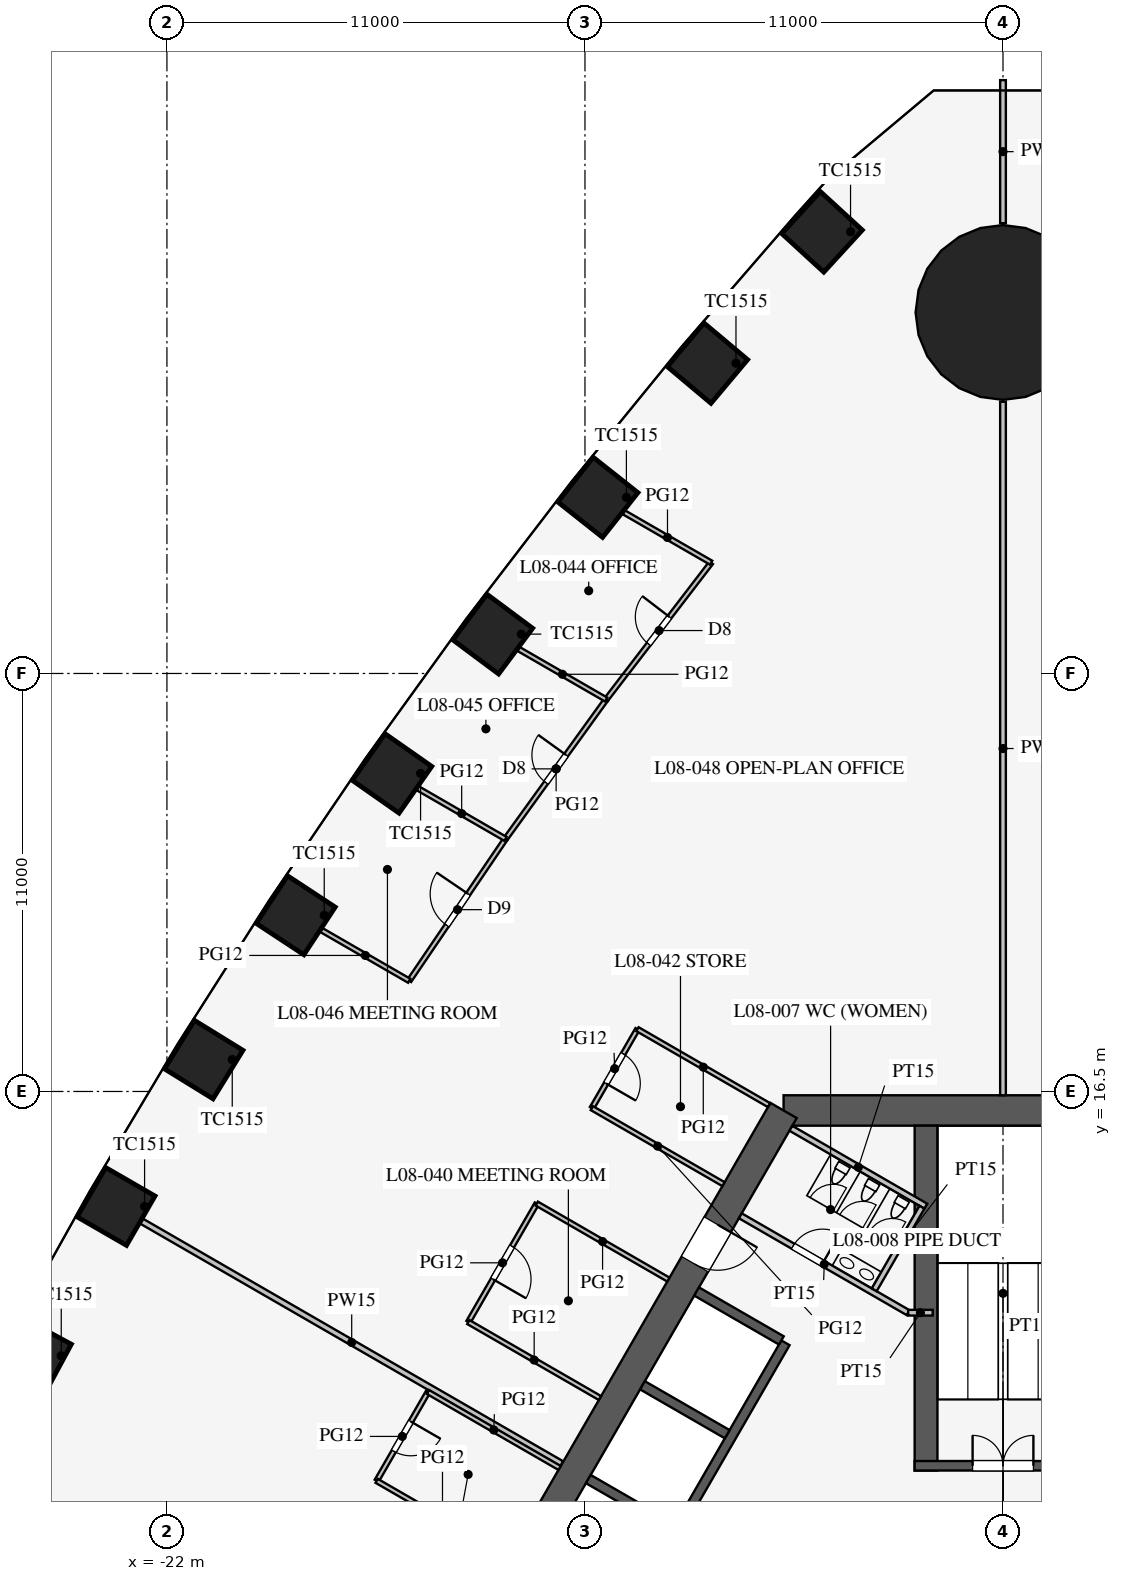
"""IFC4 building model, lengths in metres.
Left out: names, types, materials, properties, quantities, classifications, styles, units other than length and angle.
Written with IfcOpenShell. Run it as: python <this file> out.ifc"""

import sys

from ifc_helpers import new_model, si_unit, direction, frame, frame_2d, origin, origin_2d, place, context, subcontext, project, spatial, rectangle, circle, extrude, element, fill, save


model = new_model("IFC4")
c1 = context("Model", 3, precision=1e-05, world=origin(), true_north=direction((0.0, 1.0)))
c2 = subcontext(c1, "Body", "Model", "MODEL_VIEW")
j1 = project(units=[si_unit("LENGTHUNIT", "METRE"), si_unit("PLANEANGLEUNIT", "RADIAN")], contexts=[c1])
p1 = place(None, origin())
s1 = spatial("IfcSite", under=j1, at=p1, CompositionType="ELEMENT")
p2 = place(p1, origin())
s2 = spatial("IfcBuilding", under=s1, at=p2, CompositionType="ELEMENT")
p3 = place(p2, frame((0.0, 0.0, 37.5)))
s3 = spatial("IfcBuildingStorey", under=s2, at=p3, CompositionType="ELEMENT", Elevation=37.5)
for number, where, z_axis, x_axis in (
    (1, (-4.762, 39.122, 0.0), (0.0, 0.0, 1.0), (-0.676, -0.737, 0.0)),
    (2, (-7.776, 35.667, 0.0), (0.0, 0.0, 1.0), (-0.643, -0.766, 0.0)),
    (3, (-10.66, 32.135, 0.0), (0.0, 0.0, 1.0), (-0.62, -0.784, 0.0)),
    (4, (-13.426, 28.536, 0.0), (0.0, 0.0, 1.0), (-0.597, -0.802, 0.0)),
    (5, (-16.076, 24.87, 0.0), (0.0, 0.0, 1.0), (-0.574, -0.819, 0.0)),
    (6, (-18.611, 21.137, 0.0), (0.0, 0.0, 1.0), (-0.549, -0.836, 0.0)),
    (7, (-21.031, 17.339, 0.0), (0.0, 0.0, 1.0), (-0.525, -0.851, 0.0)),
    (8, (-23.338, 13.474, 0.0), (0.0, 0.0, 1.0), (-0.5, -0.866, 0.0)),
    (9, (-25.531, 9.544, 0.0), (0.0, 0.0, 1.0), (-0.475, -0.88, 0.0)),
):
    element("IfcColumn", number, at=place(p3, frame(where, z_axis=z_axis, x_axis=x_axis)), inside=s3, PredefinedType="COLUMN", context=c2, shape_type="SweptSolid", body=[
        extrude(rectangle(XDim=1.5, YDim=1.5, at=origin_2d()), origin(), (0.0, 0.0, 1.0), 4.2),
    ])
p4 = place(p3, frame((0.0, 37.0, 0.0), z_axis=(0.0, 0.0, 1.0), x_axis=(1.0, 0.0, 0.0)))
e10 = element("IfcColumn", 10, at=p4, inside=s3, PredefinedType="COLUMN", context=c2, shape_type="SweptSolid", body=[
    extrude(circle(Radius=2.3, at=origin_2d()), origin(), (0.0, 0.0, 1.0), 4.2),
])
p5 = place(p3, frame((5.773, 16.0, 0.0), z_axis=(0.0, 0.0, 1.0), x_axis=(-1.0, 0.0, 0.0)))
e11 = element("IfcWall", 11, at=p5, inside=s3, PredefinedType="SHEAR", context=c2, shape_type="SweptSolid", body=[
    extrude(rectangle(XDim=11.547, YDim=0.8, at=frame_2d((5.773, 0.0))), origin(), (0.0, 0.0, 1.0), 4.2),
])
p6 = place(p3, frame((-5.773, 16.0, 0.0), z_axis=(0.0, 0.0, 1.0), x_axis=(-0.500002442456, -0.866023993627, 0.0)))
e12 = element("IfcWall", 12, at=p6, inside=s3, PredefinedType="SHEAR", context=c2, shape_type="SweptSolid", body=[
    extrude(rectangle(XDim=21.939, YDim=0.8, at=frame_2d((10.97, 0.0))), origin(), (0.0, 0.0, 1.0), 4.2),
])
p7 = place(p6, frame((17.27, 0.0, 0.0)))
e13 = element("IfcOpeningElement", 13, at=p7, cuts=e12, PredefinedType="OPENING", context=c2, shape_type="SweptSolid", body=[
    extrude(rectangle(XDim=1.2, YDim=2.1, at=frame_2d((0.6, 1.05))), frame((0.0, 0.41, 0.0), z_axis=(0.0, -1.0, 0.0), x_axis=(1.0, 0.0, 0.0)), (0.0, 0.0, 1.0), 0.82),
])
p8 = place(p6, frame((3.47, 0.0, 0.0)))
e14 = element("IfcOpeningElement", 14, at=p8, cuts=e12, PredefinedType="OPENING", context=c2, shape_type="SweptSolid", body=[
    extrude(rectangle(XDim=1.2, YDim=2.1, at=frame_2d((0.6, 1.05))), frame((0.0, 0.41, 0.0), z_axis=(0.0, -1.0, 0.0), x_axis=(1.0, 0.0, 0.0)), (0.0, 0.0, 1.0), 0.82),
])
p9 = place(p3, frame((-5.724, 9.886, 0.0), z_axis=(0.0, 0.0, 1.0), x_axis=(-0.500001763848, -0.866024385424, 0.0)))
e15 = element("IfcWall", 15, at=p9, inside=s3, PredefinedType="SHEAR", context=c2, shape_type="SweptSolid", body=[
    extrude(rectangle(XDim=11.4, YDim=0.25, at=frame_2d((5.7, 0.0))), origin(), (0.0, 0.0, 1.0), 4.2),
])
p10 = place(p9, frame((6.525, 0.0, 0.0)))
e16 = element("IfcOpeningElement", 16, at=p10, cuts=e15, PredefinedType="OPENING", context=c2, shape_type="SweptSolid", body=[
    extrude(rectangle(XDim=1.2, YDim=2.2, at=frame_2d((0.6, 1.1))), frame((0.0, 0.135, 0.0), z_axis=(0.0, -1.0, 0.0), x_axis=(1.0, 0.0, 0.0)), (0.0, 0.0, 1.0), 0.27),
])
p11 = place(p9, frame((9.375, 0.0, 0.0)))
e17 = element("IfcOpeningElement", 17, at=p11, cuts=e15, PredefinedType="OPENING", context=c2, shape_type="SweptSolid", body=[
    extrude(rectangle(XDim=1.2, YDim=2.2, at=frame_2d((0.6, 1.1))), frame((0.0, 0.135, 0.0), z_axis=(0.0, -1.0, 0.0), x_axis=(1.0, 0.0, 0.0)), (0.0, 0.0, 1.0), 0.27),
])
p12 = place(p3, frame((-5.832, 9.949, 0.0), z_axis=(0.0, 0.0, 1.0), x_axis=(-0.866029291668, 0.499993265928, 0.0)))
e18 = element("IfcWall", 18, at=p12, inside=s3, PredefinedType="SHEAR", context=c2, shape_type="SweptSolid", body=[
    extrude(rectangle(XDim=2.575, YDim=0.25, at=frame_2d((1.288, 0.0))), origin(), (0.0, 0.0, 1.0), 4.2),
])
for number, where, z_axis, x_axis in (
    (19, (-7.257, 7.481, 0.0), (0.0, 0.0, 1.0), (-0.866, 0.5, 0.0)),
    (20, (-8.682, 5.012, 0.0), (0.0, 0.0, 1.0), (-0.866, 0.5, 0.0)),
):
    element("IfcWall", number, at=place(p3, frame(where, z_axis=z_axis, x_axis=x_axis)), inside=s3, PredefinedType="SHEAR", context=c2, shape_type="SweptSolid", body=[
        extrude(rectangle(XDim=2.575, YDim=0.25, at=frame_2d((1.288, 0.0))), origin(), (0.0, 0.0, 1.0), 4.2),
    ])
p13 = place(p3, frame((-2.025, 6.525, 0.0), z_axis=(0.0, 0.0, 1.0), x_axis=(0.0, 1.0, 0.0)))
e21 = element("IfcWall", 21, at=p13, inside=s3, PredefinedType="SHEAR", context=c2, shape_type="SweptSolid", body=[
    extrude(rectangle(XDim=9.075, YDim=0.6, at=frame_2d((4.538, 0.0))), origin(), (0.0, 0.0, 1.0), 4.2),
])
p14 = place(p3, frame((2.325, 6.65, 0.0), z_axis=(0.0, 0.0, 1.0), x_axis=(-1.0, 0.0, 0.0)))
e22 = element("IfcWall", 22, at=p14, inside=s3, PredefinedType="SHEAR", context=c2, shape_type="SweptSolid", body=[
    extrude(rectangle(XDim=4.65, YDim=0.25, at=frame_2d((2.325, 0.0))), origin(), (0.0, 0.0, 1.0), 4.2),
])
p15 = place(p14, frame((1.525, 0.0, 0.0)))
e23 = element("IfcOpeningElement", 23, at=p15, cuts=e22, PredefinedType="OPENING", context=c2, shape_type="SweptSolid", body=[
    extrude(rectangle(XDim=1.6, YDim=2.1, at=frame_2d((0.8, 1.05))), frame((0.0, 0.135, 0.0), z_axis=(0.0, -1.0, 0.0), x_axis=(1.0, 0.0, 0.0)), (0.0, 0.0, 1.0), 0.27),
])
p16 = place(p3, frame((-2.495, 10.678, 0.0), z_axis=(0.0, 0.0, 1.0), x_axis=(-0.86602216432, 0.500005610874, 0.0)))
e24 = element("IfcWall", 24, at=p16, inside=s3, PredefinedType="PARTITIONING", context=c2, shape_type="SweptSolid", body=[
    extrude(rectangle(XDim=5.1, YDim=0.15, at=frame_2d((2.55, 0.0))), origin(), (0.0, 0.0, 1.0), 4.0),
])
p17 = place(p16, frame((2.6, 0.0, 0.0)))
e25 = element("IfcOpeningElement", 25, at=p17, cuts=e24, PredefinedType="OPENING", context=c2, shape_type="SweptSolid", body=[
    extrude(rectangle(XDim=0.9, YDim=2.1, at=frame_2d((0.45, 1.05))), frame((0.0, 0.085, 0.0), z_axis=(0.0, -1.0, 0.0), x_axis=(1.0, 0.0, 0.0)), (0.0, 0.0, 1.0), 0.17),
])
p18 = place(p3, frame((-2.495, 10.678, 0.0), z_axis=(0.0, 0.0, 1.0), x_axis=(1.0, 0.0, 0.0)))
e26 = element("IfcWall", 26, at=p18, inside=s3, PredefinedType="PARTITIONING", context=c2, shape_type="SweptSolid", body=[
    extrude(rectangle(XDim=0.645, YDim=0.15, at=frame_2d((0.323, 0.0))), origin(), (0.0, 0.0, 1.0), 4.0),
])
p19 = place(p3, frame((-2.031, 13.482, 0.0), z_axis=(0.0, 0.0, 1.0), x_axis=(-0.866050731258, 0.499956128963, 0.0)))
e27 = element("IfcWall", 27, at=p19, inside=s3, PredefinedType="PARTITIONING", context=c2, shape_type="SweptSolid", body=[
    extrude(rectangle(XDim=4.1, YDim=0.15, at=frame_2d((2.05, 0.0))), origin(), (0.0, 0.0, 1.0), 4.0),
])
p20 = place(p3, frame((-3.389, 11.281, 0.0), z_axis=(0.0, 0.0, 1.0), x_axis=(0.499989096993, 0.866031698547, 0.0)))
e28 = element("IfcWall", 28, at=p20, inside=s3, PredefinedType="PARTITIONING", context=c2, shape_type="SweptSolid", body=[
    extrude(rectangle(XDim=2.51, YDim=0.15, at=frame_2d((1.255, 0.0))), origin(), (0.0, 0.0, 1.0), 4.0),
])
p21 = place(p3, frame((0.0, 16.4, 0.0), z_axis=(0.0, 0.0, 1.0), x_axis=(0.0, 1.0, 0.0)))
e29 = element("IfcWall", 29, at=p21, inside=s3, PredefinedType="PARTITIONING", context=c2, shape_type="SweptSolid", body=[
    extrude(rectangle(XDim=18.25, YDim=0.15, at=frame_2d((9.125, 0.0))), origin(), (0.0, 0.0, 1.0), 2.3),
])
p22 = place(p3, frame((0.0, 39.35, 0.0), z_axis=(0.0, 0.0, 1.0), x_axis=(0.0, 1.0, 0.0)))
e30 = element("IfcWall", 30, at=p22, inside=s3, PredefinedType="PARTITIONING", context=c2, shape_type="SweptSolid", body=[
    extrude(rectangle(XDim=3.764, YDim=0.15, at=frame_2d((1.882, 0.0))), origin(), (0.0, 0.0, 1.0), 2.3),
])
p23 = place(p3, frame((-11.613, 6.705, 0.0), z_axis=(0.0, 0.0, 1.0), x_axis=(-0.86602785495, 0.499995754432, 0.0)))
e31 = element("IfcWall", 31, at=p23, inside=s3, PredefinedType="PARTITIONING", context=c2, shape_type="SweptSolid", body=[
    extrude(rectangle(XDim=12.759, YDim=0.15, at=frame_2d((6.379, 0.0))), origin(), (0.0, 0.0, 1.0), 3.2),
])
p24 = place(p3, frame((-15.131, 8.592, 0.0), z_axis=(0.0, 0.0, 1.0), x_axis=(-0.50000943426, -0.866019956843, 0.0)))
e32 = element("IfcWall", 32, at=p24, inside=s3, PredefinedType="PARTITIONING", context=c2, shape_type="SweptSolid", body=[
    extrude(rectangle(XDim=2.7, YDim=0.12, at=frame_2d((1.35, 0.0))), origin(), (0.0, 0.0, 1.0), 2.9),
])
p25 = place(p24, frame((0.9, 0.0, 0.15)))
e33 = element("IfcOpeningElement", 33, at=p25, cuts=e32, PredefinedType="OPENING", context=c2, shape_type="SweptSolid", body=[
    extrude(rectangle(XDim=0.9, YDim=2.1, at=frame_2d((0.45, 1.05))), frame((0.0, 0.07, 0.0), z_axis=(0.0, -1.0, 0.0), x_axis=(1.0, 0.0, 0.0)), (0.0, 0.0, 1.0), 0.14),
])
p26 = place(p3, frame((-9.619, 18.14, 0.0), z_axis=(0.0, 0.0, 1.0), x_axis=(-0.500001309137, -0.866024647952, 0.0)))
e34 = element("IfcWall", 34, at=p26, inside=s3, PredefinedType="PARTITIONING", context=c2, shape_type="SweptSolid", body=[
    extrude(rectangle(XDim=2.4, YDim=0.12, at=frame_2d((1.2, 0.0))), origin(), (0.0, 0.0, 1.0), 2.9),
])
p27 = place(p26, frame((0.75, 0.0, 0.15)))
e35 = element("IfcOpeningElement", 35, at=p27, cuts=e34, PredefinedType="OPENING", context=c2, shape_type="SweptSolid", body=[
    extrude(rectangle(XDim=0.9, YDim=2.1, at=frame_2d((0.45, 1.05))), frame((0.0, 0.07, 0.0), z_axis=(0.0, -1.0, 0.0), x_axis=(1.0, 0.0, 0.0)), (0.0, 0.0, 1.0), 0.14),
])
p28 = place(p3, frame((-12.269, 13.55, 0.0), z_axis=(0.0, 0.0, 1.0), x_axis=(-0.500012057535, -0.866018442252, 0.0)))
e36 = element("IfcWall", 36, at=p28, inside=s3, PredefinedType="PARTITIONING", context=c2, shape_type="SweptSolid", body=[
    extrude(rectangle(XDim=3.6, YDim=0.12, at=frame_2d((1.8, 0.0))), origin(), (0.0, 0.0, 1.0), 2.9),
])
p29 = place(p28, frame((1.3, 0.0, 0.15)))
e37 = element("IfcOpeningElement", 37, at=p29, cuts=e36, PredefinedType="OPENING", context=c2, shape_type="SweptSolid", body=[
    extrude(rectangle(XDim=1.0, YDim=2.1, at=frame_2d((0.5, 1.05))), frame((0.0, 0.07, 0.0), z_axis=(0.0, -1.0, 0.0), x_axis=(1.0, 0.0, 0.0)), (0.0, 0.0, 1.0), 0.14),
])
for number, where, z_axis, x_axis in (
    (38, (-11.667, 6.592, 0.0), (0.0, 0.0, 1.0), (-0.866, 0.5, 0.0)),
    (39, (-13.017, 4.253, 0.0), (0.0, 0.0, 1.0), (-0.866, 0.5, 0.0)),
    (40, (-6.155, 16.14, 0.0), (0.0, 0.0, 1.0), (-0.866, 0.5, 0.0)),
    (41, (-10.605, 8.432, 0.0), (0.0, 0.0, 1.0), (-0.866, 0.5, 0.0)),
    (42, (-8.805, 11.55, 0.0), (0.0, 0.0, 1.0), (-0.866, 0.5, 0.0)),
    (43, (-7.355, 14.061, 0.0), (0.0, 0.0, 1.0), (-0.866, 0.5, 0.0)),
):
    element("IfcWall", number, at=place(p3, frame(where, z_axis=z_axis, x_axis=x_axis)), inside=s3, PredefinedType="PARTITIONING", context=c2, shape_type="SweptSolid", body=[
        extrude(rectangle(XDim=4.0, YDim=0.12, at=frame_2d((2.0, 0.0))), origin(), (0.0, 0.0, 1.0), 2.9),
    ])
p30 = place(p3, frame((-13.091, 23.146, 0.0), z_axis=(0.0, 0.0, 1.0), x_axis=(-0.561512004239, -0.827468591002, 0.0)))
e44 = element("IfcWall", 44, at=p30, inside=s3, PredefinedType="PARTITIONING", context=c2, shape_type="SweptSolid", body=[
    extrude(rectangle(XDim=4.512, YDim=0.12, at=frame_2d((2.256, 0.0))), origin(), (0.0, 0.0, 1.0), 2.9),
])
p31 = place(p30, frame((1.75, 0.0, 0.15)))
e45 = element("IfcOpeningElement", 45, at=p31, cuts=e44, PredefinedType="OPENING", context=c2, shape_type="SweptSolid", body=[
    extrude(rectangle(XDim=1.0, YDim=2.1, at=frame_2d((0.5, 1.05))), frame((0.0, 0.07, 0.0), z_axis=(0.0, -1.0, 0.0), x_axis=(1.0, 0.0, 0.0)), (0.0, 0.0, 1.0), 0.14),
])
p32 = place(p3, frame((-10.443, 26.814, 0.0), z_axis=(0.0, 0.0, 1.0), x_axis=(-0.58534077607, -0.810787380187, 0.0)))
e46 = element("IfcWall", 46, at=p32, inside=s3, PredefinedType="PARTITIONING", context=c2, shape_type="SweptSolid", body=[
    extrude(rectangle(XDim=4.523, YDim=0.12, at=frame_2d((2.262, 0.0))), origin(), (0.0, 0.0, 1.0), 2.9),
])
p33 = place(p32, frame((1.8, 0.0, 0.15)))
e47 = element("IfcOpeningElement", 47, at=p33, cuts=e46, PredefinedType="OPENING", context=c2, shape_type="SweptSolid", body=[
    extrude(rectangle(XDim=0.9, YDim=2.1, at=frame_2d((0.45, 1.05))), frame((0.0, 0.07, 0.0), z_axis=(0.0, -1.0, 0.0), x_axis=(1.0, 0.0, 0.0)), (0.0, 0.0, 1.0), 0.14),
])
p34 = place(p3, frame((-7.679, 30.415, 0.0), z_axis=(0.0, 0.0, 1.0), x_axis=(-0.608818785139, -0.79330932609, 0.0)))
e48 = element("IfcWall", 48, at=p34, inside=s3, PredefinedType="PARTITIONING", context=c2, shape_type="SweptSolid", body=[
    extrude(rectangle(XDim=4.539, YDim=0.12, at=frame_2d((2.27, 0.0))), origin(), (0.0, 0.0, 1.0), 2.9),
])
p35 = place(p34, frame((1.8, 0.0, 0.15)))
e49 = element("IfcOpeningElement", 49, at=p35, cuts=e48, PredefinedType="OPENING", context=c2, shape_type="SweptSolid", body=[
    extrude(rectangle(XDim=0.9, YDim=2.1, at=frame_2d((0.45, 1.05))), frame((0.0, 0.07, 0.0), z_axis=(0.0, -1.0, 0.0), x_axis=(1.0, 0.0, 0.0)), (0.0, 0.0, 1.0), 0.14),
])
p36 = place(p3, frame((-13.091, 23.146, 0.0), z_axis=(0.0, 0.0, 1.0), x_axis=(-0.866023818221, 0.500002746266, 0.0)))
e50 = element("IfcWall", 50, at=p36, inside=s3, PredefinedType="PARTITIONING", context=c2, shape_type="SweptSolid", body=[
    extrude(rectangle(XDim=2.664, YDim=0.12, at=frame_2d((1.332, 0.0))), origin(), (0.0, 0.0, 1.0), 2.9),
])
p37 = place(p3, frame((-10.443, 26.814, 0.0), z_axis=(0.0, 0.0, 1.0), x_axis=(-0.866031171652, 0.499990009627, 0.0)))
e51 = element("IfcWall", 51, at=p37, inside=s3, PredefinedType="PARTITIONING", context=c2, shape_type="SweptSolid", body=[
    extrude(rectangle(XDim=2.659, YDim=0.12, at=frame_2d((1.33, 0.0))), origin(), (0.0, 0.0, 1.0), 2.9),
])
p38 = place(p3, frame((-7.679, 30.415, 0.0), z_axis=(0.0, 0.0, 1.0), x_axis=(-0.866026229868, 0.499998569178, 0.0)))
e52 = element("IfcWall", 52, at=p38, inside=s3, PredefinedType="PARTITIONING", context=c2, shape_type="SweptSolid", body=[
    extrude(rectangle(XDim=2.653, YDim=0.12, at=frame_2d((1.327, 0.0))), origin(), (0.0, 0.0, 1.0), 2.9),
])
p39 = place(p3, frame((-15.624, 19.413, 0.0), z_axis=(0.0, 0.0, 1.0), x_axis=(-0.866020974757, 0.500007671222, 0.0)))
e53 = element("IfcWall", 53, at=p39, inside=s3, PredefinedType="PARTITIONING", context=c2, shape_type="SweptSolid", body=[
    extrude(rectangle(XDim=2.667, YDim=0.12, at=frame_2d((1.334, 0.0))), origin(), (0.0, 0.0, 1.0), 2.9),
])
p40 = place(p17, frame((0.9, 0.0, 0.0), z_axis=(0.0, 0.0, 1.0), x_axis=(-1.0, 0.0, 0.0)))
e54 = element("IfcDoor", 54, at=p40, inside=s3, OperationType="SINGLE_SWING_RIGHT", PredefinedType="DOOR", context=c2, shape_type="SweptSolid", body=[
    extrude(rectangle(XDim=0.9, YDim=2.1, at=frame_2d((0.45, 1.05))), frame((0.0, 0.025, 0.0), z_axis=(0.0, -1.0, 0.0), x_axis=(1.0, 0.0, 0.0)), (0.0, 0.0, 1.0), 0.05),
])
fill(e25, e54)
p41 = place(p15, frame((1.6, 0.0, 0.0), z_axis=(0.0, 0.0, 1.0), x_axis=(-1.0, 0.0, 0.0)))
e55 = element("IfcDoor", 55, at=p41, inside=s3, OperationType="DOUBLE_DOOR_SINGLE_SWING", PredefinedType="DOOR", context=c2, shape_type="SweptSolid", body=[
    extrude(rectangle(XDim=1.6, YDim=2.1, at=frame_2d((0.8, 1.05))), frame((0.0, 0.025, 0.0), z_axis=(0.0, -1.0, 0.0), x_axis=(1.0, 0.0, 0.0)), (0.0, 0.0, 1.0), 0.05),
])
fill(e23, e55)
p42 = place(p8, origin())
e56 = element("IfcDoor", 56, at=p42, inside=s3, OperationType="SINGLE_SWING_LEFT", PredefinedType="DOOR", context=c2, shape_type="SweptSolid", body=[
    extrude(rectangle(XDim=1.2, YDim=2.1, at=frame_2d((0.6, 1.05))), frame((0.0, 0.025, 0.0), z_axis=(0.0, -1.0, 0.0), x_axis=(1.0, 0.0, 0.0)), (0.0, 0.0, 1.0), 0.05),
])
fill(e14, e56)
p43 = place(p29, origin())
e57 = element("IfcDoor", 57, at=p43, inside=s3, OperationType="SINGLE_SWING_RIGHT", PredefinedType="DOOR", context=c2, shape_type="SweptSolid", body=[
    extrude(rectangle(XDim=1.0, YDim=2.1, at=frame_2d((0.5, 1.05))), frame((0.0, 0.025, 0.0), z_axis=(0.0, -1.0, 0.0), x_axis=(1.0, 0.0, 0.0)), (0.0, 0.0, 1.0), 0.05),
])
fill(e37, e57)
p44 = place(p25, origin())
e58 = element("IfcDoor", 58, at=p44, inside=s3, OperationType="SINGLE_SWING_LEFT", PredefinedType="DOOR", context=c2, shape_type="SweptSolid", body=[
    extrude(rectangle(XDim=0.9, YDim=2.1, at=frame_2d((0.45, 1.05))), frame((0.0, 0.025, 0.0), z_axis=(0.0, -1.0, 0.0), x_axis=(1.0, 0.0, 0.0)), (0.0, 0.0, 1.0), 0.05),
])
fill(e33, e58)
p45 = place(p27, origin())
e59 = element("IfcDoor", 59, at=p45, inside=s3, OperationType="SINGLE_SWING_RIGHT", PredefinedType="DOOR", context=c2, shape_type="SweptSolid", body=[
    extrude(rectangle(XDim=0.9, YDim=2.1, at=frame_2d((0.45, 1.05))), frame((0.0, 0.025, 0.0), z_axis=(0.0, -1.0, 0.0), x_axis=(1.0, 0.0, 0.0)), (0.0, 0.0, 1.0), 0.05),
])
fill(e35, e59)
p46 = place(p35, frame((0.9, 0.0, 0.0), z_axis=(0.0, 0.0, 1.0), x_axis=(-1.0, 0.0, 0.0)))
e60 = element("IfcDoor", 60, at=p46, inside=s3, OperationType="SINGLE_SWING_RIGHT", PredefinedType="DOOR", context=c2, shape_type="SweptSolid", body=[
    extrude(rectangle(XDim=0.9, YDim=2.1, at=frame_2d((0.45, 1.05))), frame((0.0, 0.025, 0.0), z_axis=(0.0, -1.0, 0.0), x_axis=(1.0, 0.0, 0.0)), (0.0, 0.0, 1.0), 0.05),
])
fill(e49, e60)
p47 = place(p33, frame((0.9, 0.0, 0.0), z_axis=(0.0, 0.0, 1.0), x_axis=(-1.0, 0.0, 0.0)))
e61 = element("IfcDoor", 61, at=p47, inside=s3, OperationType="SINGLE_SWING_RIGHT", PredefinedType="DOOR", context=c2, shape_type="SweptSolid", body=[
    extrude(rectangle(XDim=0.9, YDim=2.1, at=frame_2d((0.45, 1.05))), frame((0.0, 0.025, 0.0), z_axis=(0.0, -1.0, 0.0), x_axis=(1.0, 0.0, 0.0)), (0.0, 0.0, 1.0), 0.05),
])
fill(e47, e61)
p48 = place(p31, frame((1.0, 0.0, 0.0), z_axis=(0.0, 0.0, 1.0), x_axis=(-1.0, 0.0, 0.0)))
e62 = element("IfcDoor", 62, at=p48, inside=s3, OperationType="SINGLE_SWING_RIGHT", PredefinedType="DOOR", context=c2, shape_type="SweptSolid", body=[
    extrude(rectangle(XDim=1.0, YDim=2.1, at=frame_2d((0.5, 1.05))), frame((0.0, 0.025, 0.0), z_axis=(0.0, -1.0, 0.0), x_axis=(1.0, 0.0, 0.0)), (0.0, 0.0, 1.0), 0.05),
])
fill(e45, e62)
save(model, sys.argv[1])
